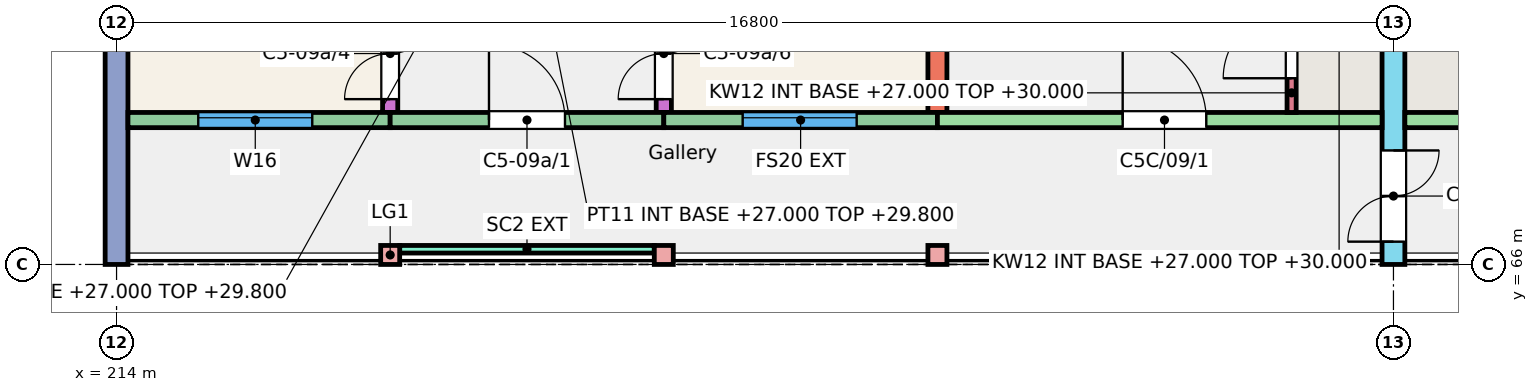
"""IFC4 building model, lengths in metres.
Left out: names, types, materials, properties, quantities, classifications, styles, units other than length and angle.
Written with IfcOpenShell. Run it as: python <this file> out.ifc"""

import sys

from ifc_helpers import new_model, si_unit, direction, frame, frame_2d, origin, origin_2d, place, context, subcontext, project, spatial, rectangle, extrude, element, fill, save


model = new_model("IFC4")
c1 = context("Model", 3, precision=1e-05, world=origin(), true_north=direction((0.0, 1.0)))
c2 = subcontext(c1, "Body", "Model", "MODEL_VIEW")
j1 = project(units=[si_unit("LENGTHUNIT", "METRE"), si_unit("PLANEANGLEUNIT", "RADIAN")], contexts=[c1])
p1 = place(None, origin())
s1 = spatial("IfcSite", under=j1, at=p1, CompositionType="ELEMENT")
p2 = place(p1, origin())
s2 = spatial("IfcBuilding", under=s1, at=p2, CompositionType="ELEMENT")
p3 = place(p2, frame((0.0, 0.0, 27.0)))
s3 = spatial("IfcBuildingStorey", under=s2, at=p3, CompositionType="ELEMENT", Elevation=27.0)
p4 = place(p3, frame((214.0, 66.0, 0.0), z_axis=(0.0, 0.0, 1.0), x_axis=(0.0, 1.0, 0.0)))
e1 = element("IfcWall", 1, at=p4, inside=s3, PredefinedType="SHEAR", context=c2, shape_type="SweptSolid", body=[
    extrude(rectangle(XDim=11.0, YDim=0.3, at=frame_2d((5.5, 0.0))), origin(), (0.0, 0.0, 1.0), 3.0),
])
p5 = place(p4, frame((3.55, 0.0, 0.9)))
e2 = element("IfcOpeningElement", 2, at=p5, cuts=e1, PredefinedType="OPENING", context=c2, shape_type="SweptSolid", body=[
    extrude(rectangle(XDim=1.5, YDim=1.5, at=frame_2d((0.75, 0.75))), frame((0.0, 0.16, 0.0), z_axis=(0.0, -1.0, 0.0), x_axis=(1.0, 0.0, 0.0)), (0.0, 0.0, 1.0), 0.32),
])
p6 = place(p4, frame((8.255, 0.0, 0.9)))
e3 = element("IfcOpeningElement", 3, at=p6, cuts=e1, PredefinedType="OPENING", context=c2, shape_type="SweptSolid", body=[
    extrude(rectangle(XDim=1.2, YDim=1.5, at=frame_2d((0.6, 0.75))), frame((0.0, 0.16, 0.0), z_axis=(0.0, -1.0, 0.0), x_axis=(1.0, 0.0, 0.0)), (0.0, 0.0, 1.0), 0.32),
])
p7 = place(p3, frame((217.6, 68.0, 0.0), z_axis=(0.0, 0.0, 1.0), x_axis=(0.0, 1.0, 0.0)))
e4 = element("IfcWall", 4, at=p7, inside=s3, PredefinedType="SHEAR", context=c2, shape_type="SweptSolid", body=[
    extrude(rectangle(XDim=9.0, YDim=0.2, at=frame_2d((4.5, 0.0))), origin(), (0.0, 0.0, 1.0), 3.0),
])
p8 = place(p7, frame((0.175, 0.0, 0.0)))
e5 = element("IfcOpeningElement", 5, at=p8, cuts=e4, PredefinedType="OPENING", context=c2, shape_type="SweptSolid", body=[
    extrude(rectangle(XDim=1.2, YDim=2.1, at=frame_2d((0.6, 1.05))), frame((0.0, 0.11, 0.0), z_axis=(0.0, -1.0, 0.0), x_axis=(1.0, 0.0, 0.0)), (0.0, 0.0, 1.0), 0.22),
])
p9 = place(p7, frame((6.4, 0.0, 0.0)))
e6 = element("IfcOpeningElement", 6, at=p9, cuts=e4, PredefinedType="OPENING", context=c2, shape_type="SweptSolid", body=[
    extrude(rectangle(XDim=1.2, YDim=2.1, at=frame_2d((0.6, 1.05))), frame((0.0, 0.11, 0.0), z_axis=(0.0, -1.0, 0.0), x_axis=(1.0, 0.0, 0.0)), (0.0, 0.0, 1.0), 0.22),
])
p10 = place(p3, frame((221.2, 68.0, 0.0), z_axis=(0.0, 0.0, 1.0), x_axis=(0.0, 1.0, 0.0)))
e7 = element("IfcWall", 7, at=p10, inside=s3, PredefinedType="SHEAR", context=c2, shape_type="SweptSolid", body=[
    extrude(rectangle(XDim=9.0, YDim=0.2, at=frame_2d((4.5, 0.0))), origin(), (0.0, 0.0, 1.0), 3.0),
])
p11 = place(p10, frame((0.175, 0.0, 0.0)))
e8 = element("IfcOpeningElement", 8, at=p11, cuts=e7, PredefinedType="OPENING", context=c2, shape_type="SweptSolid", body=[
    extrude(rectangle(XDim=1.2, YDim=2.1, at=frame_2d((0.6, 1.05))), frame((0.0, 0.11, 0.0), z_axis=(0.0, -1.0, 0.0), x_axis=(1.0, 0.0, 0.0)), (0.0, 0.0, 1.0), 0.22),
])
p12 = place(p10, frame((6.4, 0.0, 0.0)))
e9 = element("IfcOpeningElement", 9, at=p12, cuts=e7, PredefinedType="OPENING", context=c2, shape_type="SweptSolid", body=[
    extrude(rectangle(XDim=1.2, YDim=2.1, at=frame_2d((0.6, 1.05))), frame((0.0, 0.11, 0.0), z_axis=(0.0, -1.0, 0.0), x_axis=(1.0, 0.0, 0.0)), (0.0, 0.0, 1.0), 0.22),
])
p13 = place(p3, frame((224.8, 68.0, 0.0), z_axis=(0.0, 0.0, 1.0), x_axis=(0.0, 1.0, 0.0)))
e10 = element("IfcWall", 10, at=p13, inside=s3, PredefinedType="SHEAR", context=c2, shape_type="SweptSolid", body=[
    extrude(rectangle(XDim=9.0, YDim=0.25, at=frame_2d((4.5, 0.0))), origin(), (0.0, 0.0, 1.0), 3.0),
])
p14 = place(p3, frame((230.8, 66.0, 0.0), z_axis=(0.0, 0.0, 1.0), x_axis=(0.0, 1.0, 0.0)))
e11 = element("IfcWall", 11, at=p14, inside=s3, PredefinedType="SHEAR", context=c2, shape_type="SweptSolid", body=[
    extrude(rectangle(XDim=11.0, YDim=0.3, at=frame_2d((5.5, 0.0))), origin(), (0.0, 0.0, 1.0), 3.0),
])
p15 = place(p14, frame((0.3, 0.0, 0.0)))
e12 = element("IfcOpeningElement", 12, at=p15, cuts=e11, PredefinedType="OPENING", context=c2, shape_type="SweptSolid", body=[
    extrude(rectangle(XDim=1.2, YDim=2.1, at=frame_2d((0.6, 1.05))), frame((0.0, 0.16, 0.0), z_axis=(0.0, -1.0, 0.0), x_axis=(1.0, 0.0, 0.0)), (0.0, 0.0, 1.0), 0.32),
])
p16 = place(p3, frame((214.15, 67.9, 0.0), z_axis=(0.0, 0.0, 1.0), x_axis=(1.0, 0.0, 0.0)))
e13 = element("IfcWall", 13, at=p16, inside=s3, PredefinedType="SOLIDWALL", context=c2, shape_type="SweptSolid", body=[
    extrude(rectangle(XDim=3.45, YDim=0.2, at=frame_2d((1.725, 0.0))), origin(), (0.0, 0.0, 1.0), 3.0),
])
p17 = place(p16, frame((0.925, 0.0, 0.9)))
e14 = element("IfcOpeningElement", 14, at=p17, cuts=e13, PredefinedType="OPENING", context=c2, shape_type="SweptSolid", body=[
    extrude(rectangle(XDim=1.5, YDim=1.5, at=frame_2d((0.75, 0.75))), frame((0.0, 0.11, 0.0), z_axis=(0.0, -1.0, 0.0), x_axis=(1.0, 0.0, 0.0)), (0.0, 0.0, 1.0), 0.22),
])
p18 = place(p3, frame((217.6, 67.9, 0.0), z_axis=(0.0, 0.0, 1.0), x_axis=(1.0, 0.0, 0.0)))
e15 = element("IfcWall", 15, at=p18, inside=s3, PredefinedType="SOLIDWALL", context=c2, shape_type="SweptSolid", body=[
    extrude(rectangle(XDim=3.6, YDim=0.2, at=frame_2d((1.8, 0.0))), origin(), (0.0, 0.0, 1.0), 3.0),
])
p19 = place(p18, frame((1.3, 0.0, 0.0)))
e16 = element("IfcOpeningElement", 16, at=p19, cuts=e15, PredefinedType="OPENING", context=c2, shape_type="SweptSolid", body=[
    extrude(rectangle(XDim=1.0, YDim=2.1, at=frame_2d((0.5, 1.05))), frame((0.0, 0.11, 0.0), z_axis=(0.0, -1.0, 0.0), x_axis=(1.0, 0.0, 0.0)), (0.0, 0.0, 1.0), 0.22),
])
p20 = place(p3, frame((221.2, 67.9, 0.0), z_axis=(0.0, 0.0, 1.0), x_axis=(1.0, 0.0, 0.0)))
e17 = element("IfcWall", 17, at=p20, inside=s3, PredefinedType="SOLIDWALL", context=c2, shape_type="SweptSolid", body=[
    extrude(rectangle(XDim=3.6, YDim=0.2, at=frame_2d((1.8, 0.0))), origin(), (0.0, 0.0, 1.0), 3.0),
])
p21 = place(p20, frame((1.038, 0.0, 0.9)))
e18 = element("IfcOpeningElement", 18, at=p21, cuts=e17, PredefinedType="OPENING", context=c2, shape_type="SweptSolid", body=[
    extrude(rectangle(XDim=1.5, YDim=1.5, at=frame_2d((0.75, 0.75))), frame((0.0, 0.11, 0.0), z_axis=(0.0, -1.0, 0.0), x_axis=(1.0, 0.0, 0.0)), (0.0, 0.0, 1.0), 0.22),
])
p22 = place(p3, frame((224.8, 67.9, 0.0), z_axis=(0.0, 0.0, 1.0), x_axis=(1.0, 0.0, 0.0)))
e19 = element("IfcWall", 19, at=p22, inside=s3, PredefinedType="SHEAR", context=c2, shape_type="SweptSolid", body=[
    extrude(rectangle(XDim=5.85, YDim=0.2, at=frame_2d((2.925, 0.0))), origin(), (0.0, 0.0, 1.0), 3.0),
])
p23 = place(p22, frame((2.438, 0.0, 0.0)))
e20 = element("IfcOpeningElement", 20, at=p23, cuts=e19, PredefinedType="OPENING", context=c2, shape_type="SweptSolid", body=[
    extrude(rectangle(XDim=1.1, YDim=2.1, at=frame_2d((0.55, 1.05))), frame((0.0, 0.11, 0.0), z_axis=(0.0, -1.0, 0.0), x_axis=(1.0, 0.0, 0.0)), (0.0, 0.0, 1.0), 0.22),
])
p24 = place(p3, frame((229.46, 68.0, 0.0), z_axis=(0.0, 0.0, 1.0), x_axis=(0.0, 1.0, 0.0)))
e21 = element("IfcWall", 21, at=p24, inside=s3, PredefinedType="SHEAR", context=c2, shape_type="SweptSolid", body=[
    extrude(rectangle(XDim=1.72, YDim=0.12, at=frame_2d((0.86, 0.0))), origin(), (0.0, 0.0, 1.0), 3.0),
])
p25 = place(p24, frame((0.45, 0.0, 0.0)))
e22 = element("IfcOpeningElement", 22, at=p25, cuts=e21, PredefinedType="OPENING", context=c2, shape_type="SweptSolid", body=[
    extrude(rectangle(XDim=0.9, YDim=2.1, at=frame_2d((0.45, 1.05))), frame((0.0, 0.07, 0.0), z_axis=(0.0, -1.0, 0.0), x_axis=(1.0, 0.0, 0.0)), (0.0, 0.0, 1.0), 0.14),
])
p26 = place(p3, frame((230.95, 67.9, 0.0), z_axis=(0.0, 0.0, 1.0), x_axis=(1.0, 0.0, 0.0)))
e23 = element("IfcWall", 23, at=p26, inside=s3, PredefinedType="SHEAR", context=c2, shape_type="SweptSolid", body=[
    extrude(rectangle(XDim=5.85, YDim=0.2, at=frame_2d((2.925, 0.0))), origin(), (0.0, 0.0, 1.0), 2.75),
])
p27 = place(p26, frame((2.312, 0.0, 0.0)))
e24 = element("IfcOpeningElement", 24, at=p27, cuts=e23, PredefinedType="OPENING", context=c2, shape_type="SweptSolid", body=[
    extrude(rectangle(XDim=1.1, YDim=2.1, at=frame_2d((0.55, 1.05))), frame((0.0, 0.11, 0.0), z_axis=(0.0, -1.0, 0.0), x_axis=(1.0, 0.0, 0.0)), (0.0, 0.0, 1.0), 0.22),
])
for number, where, z_axis, x_axis in (
    (25, (217.6, 66.125, 0.0), (0.0, 0.0, 1.0), (1.0, 0.0, 0.0)),
    (26, (221.2, 66.125, 0.0), (0.0, 0.0, 1.0), (1.0, 0.0, 0.0)),
    (27, (224.8, 66.125, 0.0), (0.0, 0.0, 1.0), (1.0, 0.0, 0.0)),
):
    element("IfcColumn", number, at=place(p3, frame(where, z_axis=z_axis, x_axis=x_axis)), inside=s3, PredefinedType="COLUMN", context=c2, shape_type="SweptSolid", body=[
        extrude(rectangle(XDim=0.25, YDim=0.25, at=origin_2d()), origin(), (0.0, 0.0, 1.0), 3.0),
    ])
p28 = place(p3, frame((217.725, 66.2, 0.0), z_axis=(0.0, 0.0, 1.0), x_axis=(1.0, 0.0, 0.0)))
e28 = element("IfcWall", 28, at=p28, inside=s3, PredefinedType="SOLIDWALL", context=c2, shape_type="SweptSolid", body=[
    extrude(rectangle(XDim=3.35, YDim=0.1, at=frame_2d((1.675, 0.0))), origin(), (0.0, 0.0, 1.0), 2.45),
])
p29 = place(p17, origin())
e29 = element("IfcWindow", 29, at=p29, inside=s3, PartitioningType="SINGLE_PANEL", PredefinedType="WINDOW", context=c2, shape_type="SweptSolid", body=[
    extrude(rectangle(XDim=1.5, YDim=1.5, at=frame_2d((0.75, 0.75))), frame((0.0, 0.06, 0.0), z_axis=(0.0, -1.0, 0.0), x_axis=(1.0, 0.0, 0.0)), (0.0, 0.0, 1.0), 0.06),
])
fill(e14, e29)
p30 = place(p21, origin())
e30 = element("IfcWindow", 30, at=p30, inside=s3, PartitioningType="SINGLE_PANEL", PredefinedType="WINDOW", context=c2, shape_type="SweptSolid", body=[
    extrude(rectangle(XDim=1.5, YDim=1.5, at=frame_2d((0.75, 0.75))), frame((0.0, 0.06, 0.0), z_axis=(0.0, -1.0, 0.0), x_axis=(1.0, 0.0, 0.0)), (0.0, 0.0, 1.0), 0.06),
])
fill(e18, e30)
p31 = place(p19, origin())
e31 = element("IfcDoor", 31, at=p31, inside=s3, OperationType="SINGLE_SWING_LEFT", PredefinedType="DOOR", context=c2, shape_type="SweptSolid", body=[
    extrude(rectangle(XDim=1.0, YDim=2.1, at=frame_2d((0.5, 1.05))), frame((0.0, 0.025, 0.0), z_axis=(0.0, -1.0, 0.0), x_axis=(1.0, 0.0, 0.0)), (0.0, 0.0, 1.0), 0.05),
])
fill(e16, e31)
p32 = place(p8, origin())
e32 = element("IfcDoor", 32, at=p32, inside=s3, OperationType="DOUBLE_DOOR_SINGLE_SWING", PredefinedType="DOOR", context=c2, shape_type="SweptSolid", body=[
    extrude(rectangle(XDim=1.2, YDim=2.1, at=frame_2d((0.6, 1.05))), frame((0.0, 0.025, 0.0), z_axis=(0.0, -1.0, 0.0), x_axis=(1.0, 0.0, 0.0)), (0.0, 0.0, 1.0), 0.05),
])
fill(e5, e32)
p33 = place(p11, origin())
e33 = element("IfcDoor", 33, at=p33, inside=s3, OperationType="DOUBLE_DOOR_SINGLE_SWING", PredefinedType="DOOR", context=c2, shape_type="SweptSolid", body=[
    extrude(rectangle(XDim=1.2, YDim=2.1, at=frame_2d((0.6, 1.05))), frame((0.0, 0.025, 0.0), z_axis=(0.0, -1.0, 0.0), x_axis=(1.0, 0.0, 0.0)), (0.0, 0.0, 1.0), 0.05),
])
fill(e8, e33)
p34 = place(p23, origin())
e34 = element("IfcDoor", 34, at=p34, inside=s3, OperationType="SINGLE_SWING_LEFT", PredefinedType="DOOR", context=c2, shape_type="SweptSolid", body=[
    extrude(rectangle(XDim=1.1, YDim=2.1, at=frame_2d((0.55, 1.05))), frame((0.0, 0.025, 0.0), z_axis=(0.0, -1.0, 0.0), x_axis=(1.0, 0.0, 0.0)), (0.0, 0.0, 1.0), 0.05),
])
fill(e20, e34)
p35 = place(p25, origin())
e35 = element("IfcDoor", 35, at=p35, inside=s3, OperationType="SINGLE_SWING_LEFT", PredefinedType="DOOR", context=c2, shape_type="SweptSolid", body=[
    extrude(rectangle(XDim=0.9, YDim=2.1, at=frame_2d((0.45, 1.05))), frame((0.0, 0.025, 0.0), z_axis=(0.0, -1.0, 0.0), x_axis=(1.0, 0.0, 0.0)), (0.0, 0.0, 1.0), 0.05),
])
fill(e22, e35)
p36 = place(p15, origin())
e36 = element("IfcDoor", 36, at=p36, inside=s3, OperationType="DOUBLE_DOOR_SINGLE_SWING", PredefinedType="DOOR", context=c2, shape_type="SweptSolid", body=[
    extrude(rectangle(XDim=1.2, YDim=2.1, at=frame_2d((0.6, 1.05))), frame((0.0, 0.025, 0.0), z_axis=(0.0, -1.0, 0.0), x_axis=(1.0, 0.0, 0.0)), (0.0, 0.0, 1.0), 0.05),
])
fill(e12, e36)
save(model, sys.argv[1])
